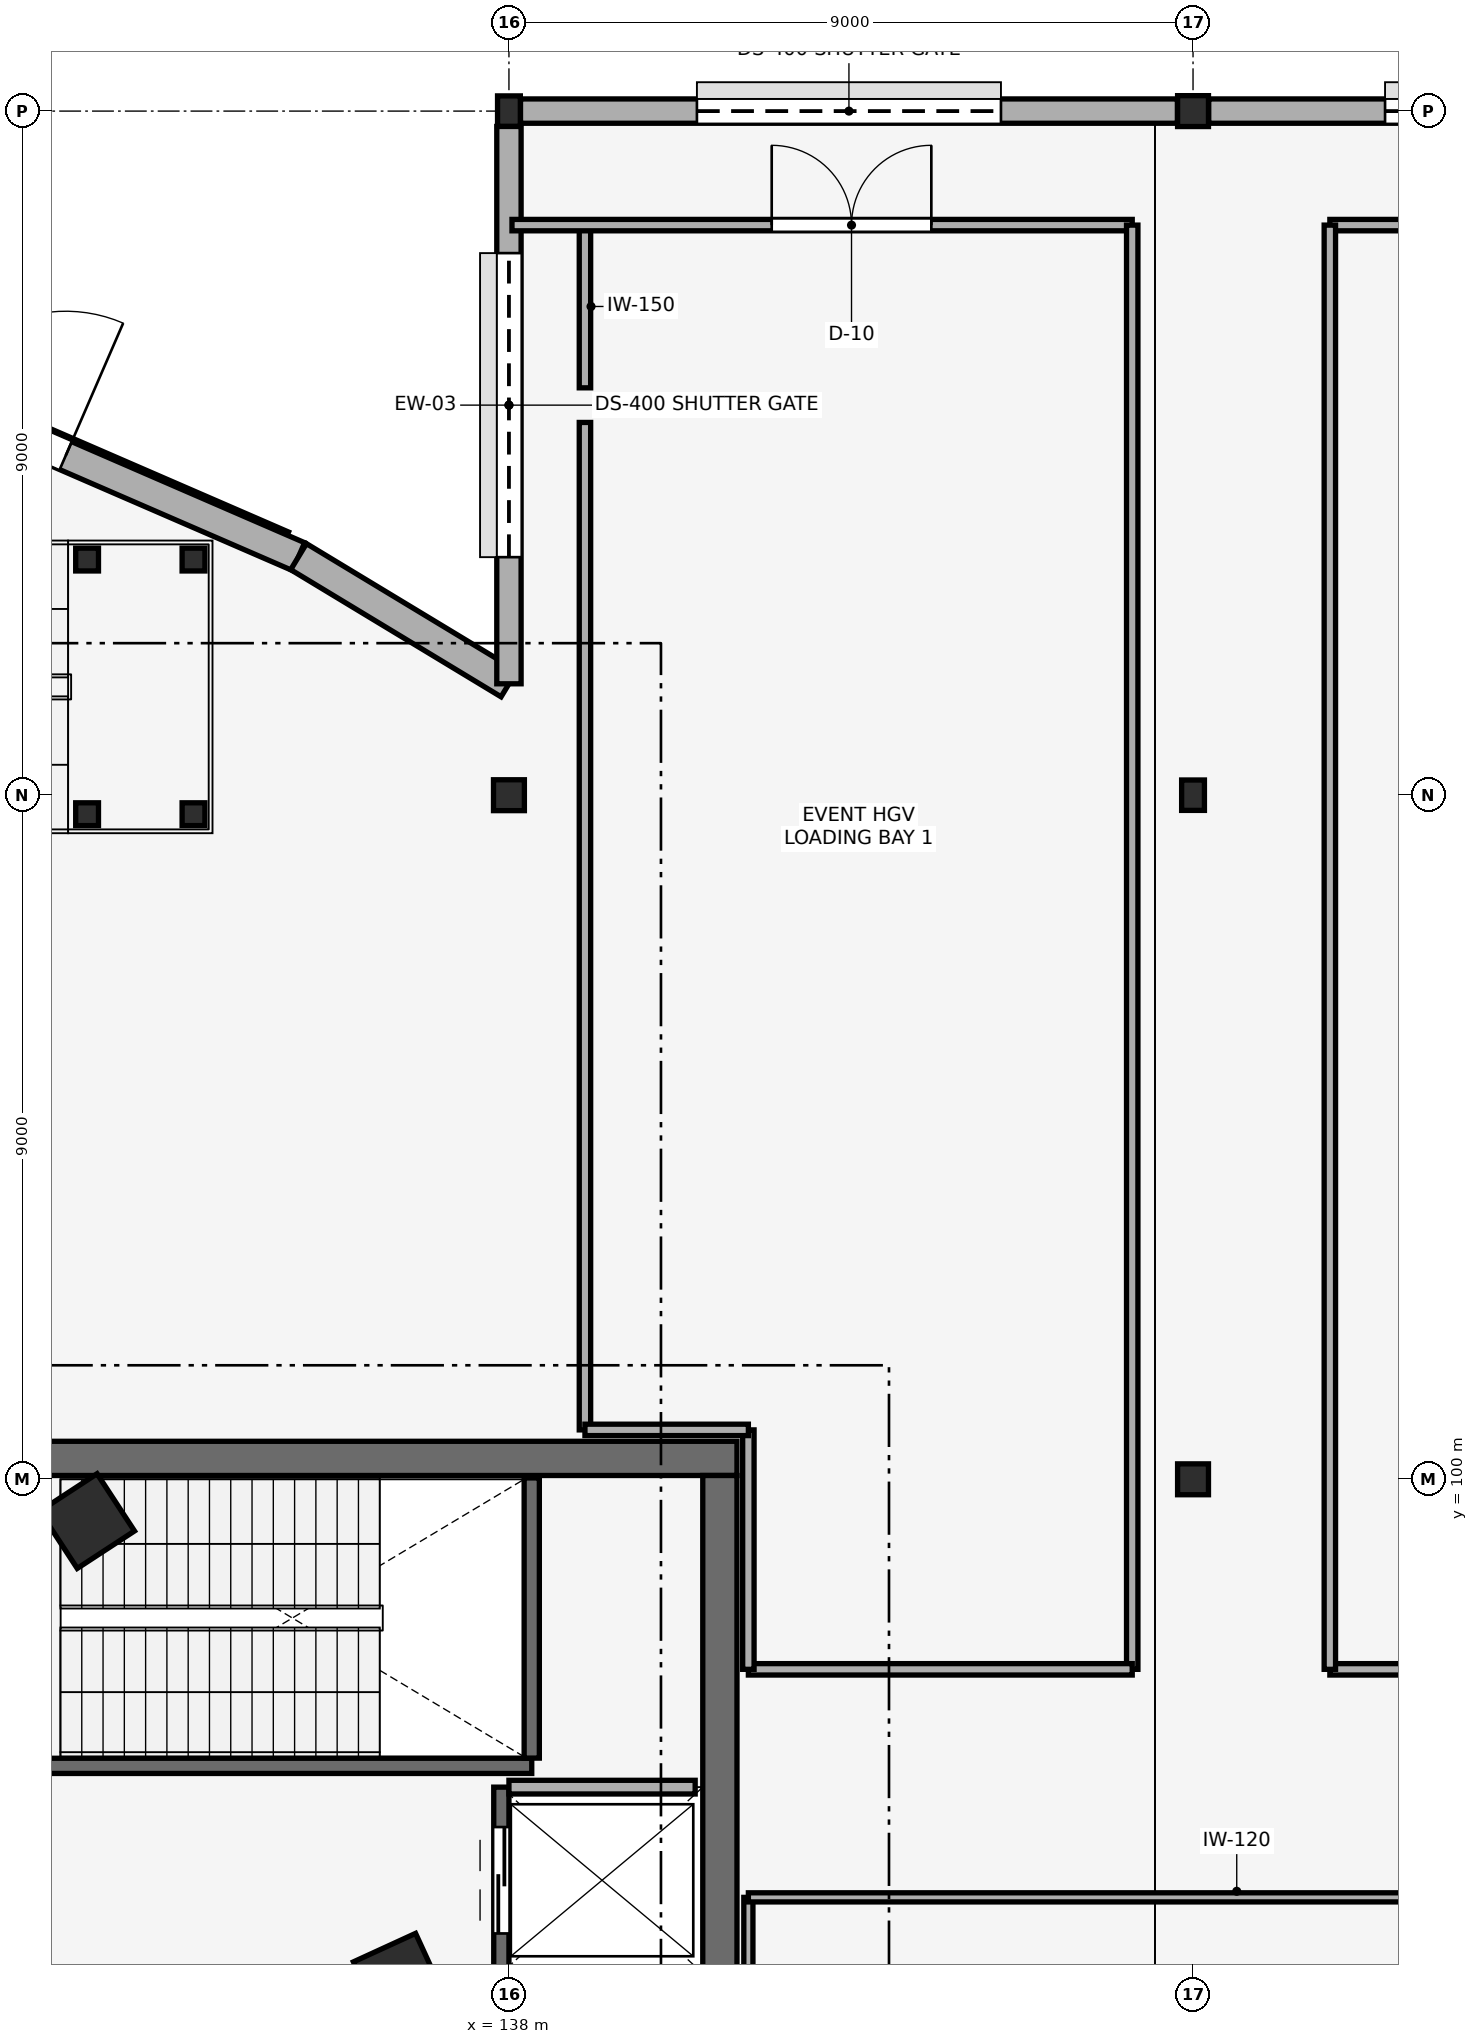
"""IFC4 building model, lengths in metres.
Left out: names, types, materials, properties, quantities, classifications, styles, units other than length and angle.
Written with IfcOpenShell. Run it as: python <this file> out.ifc"""

import sys

from ifc_helpers import new_model, si_unit, direction, frame, frame_2d, origin, origin_2d, place, context, subcontext, project, spatial, rectangle, hollow_rectangle, hollow_circle, i_section, extrude, element, fill, save


model = new_model("IFC4")
c1 = context("Model", 3, precision=1e-05, world=origin(), true_north=direction((0.0, 1.0)))
c2 = subcontext(c1, "Body", "Model", "MODEL_VIEW")
j1 = project(units=[si_unit("LENGTHUNIT", "METRE"), si_unit("PLANEANGLEUNIT", "RADIAN")], contexts=[c1])
p1 = place(None, origin())
s1 = spatial("IfcSite", under=j1, at=p1, CompositionType="ELEMENT")
p2 = place(p1, origin())
s2 = spatial("IfcBuilding", under=s1, at=p2, CompositionType="ELEMENT")
p3 = place(p2, origin())
s3 = spatial("IfcBuildingStorey", under=s2, at=p3, CompositionType="ELEMENT", Elevation=0.0)
for number, where, z_axis, x_axis in (
    (1, (136.55, 93.43, 0.0), (0.0, 0.0, 1.0), (0.909, 0.417, 0.0)),
    (2, (132.451, 99.45, 0.0), (0.0, 0.0, 1.0), (0.837, 0.547, 0.0)),
):
    element("IfcColumn", number, at=place(p3, frame(where, z_axis=z_axis, x_axis=x_axis)), inside=s3, PredefinedType="COLUMN", context=c2, shape_type="SweptSolid", body=[
        extrude(rectangle(XDim=0.9, YDim=0.9, at=origin_2d()), origin(), (0.0, 0.0, 1.0), 5.4),
    ])
p4 = place(p3, frame((138.0, 109.0, 0.0), z_axis=(0.0, 0.0, 1.0), x_axis=(1.0, 0.0, 0.0)))
e3 = element("IfcColumn", 3, at=p4, inside=s3, PredefinedType="COLUMN", context=c2, shape_type="SweptSolid", body=[
    extrude(hollow_circle(Radius=0.203, WallThickness=0.016, at=origin_2d()), origin(), (0.0, 0.0, 1.0), 5.4),
])
p5 = place(p3, frame((138.0, 118.0, 0.0), z_axis=(0.0, 0.0, 1.0), x_axis=(1.0, 0.0, 0.0)))
e4 = element("IfcColumn", 4, at=p5, inside=s3, PredefinedType="COLUMN", context=c2, shape_type="SweptSolid", body=[
    extrude(i_section(OverallWidth=0.3, OverallDepth=0.4, WebThickness=0.013, FlangeThickness=0.024, FilletRadius=0.027, at=origin_2d()), origin(), (0.0, 0.0, 1.0), 5.4),
])
p6 = place(p3, frame((147.0, 100.0, 0.0), z_axis=(0.0, 0.0, 1.0), x_axis=(1.0, 0.0, 0.0)))
e5 = element("IfcColumn", 5, at=p6, inside=s3, PredefinedType="COLUMN", context=c2, shape_type="SweptSolid", body=[
    extrude(hollow_circle(Radius=0.203, WallThickness=0.016, at=origin_2d()), origin(), (0.0, 0.0, 1.0), 5.4),
])
p7 = place(p3, frame((147.0, 109.0, 0.0), z_axis=(0.0, 0.0, 1.0), x_axis=(1.0, 0.0, 0.0)))
e6 = element("IfcColumn", 6, at=p7, inside=s3, PredefinedType="COLUMN", context=c2, shape_type="SweptSolid", body=[
    extrude(i_section(OverallWidth=0.3, OverallDepth=0.4, WebThickness=0.013, FlangeThickness=0.024, FilletRadius=0.027, at=origin_2d()), origin(), (0.0, 0.0, 1.0), 5.4),
])
p8 = place(p3, frame((147.0, 118.0, 0.0), z_axis=(0.0, 0.0, 1.0), x_axis=(1.0, 0.0, 0.0)))
e7 = element("IfcColumn", 7, at=p8, inside=s3, PredefinedType="COLUMN", context=c2, shape_type="SweptSolid", body=[
    extrude(hollow_circle(Radius=0.203, WallThickness=0.016, at=origin_2d()), origin(), (0.0, 0.0, 1.0), 5.4),
])
p9 = place(p3, frame((129.6, 100.275, 0.0), z_axis=(0.0, 0.0, 1.0), x_axis=(1.0, 0.0, 0.0)))
e8 = element("IfcWall", 8, at=p9, inside=s3, PredefinedType="SHEAR", context=c2, shape_type="SweptSolid", body=[
    extrude(rectangle(XDim=11.4, YDim=0.45, at=frame_2d((5.7, 0.0))), origin(), (0.0, 0.0, 1.0), 5.4),
])
p10 = place(p3, frame((140.775, 90.95, 0.0), z_axis=(0.0, 0.0, 1.0), x_axis=(0.0, 1.0, 0.0)))
e9 = element("IfcWall", 9, at=p10, inside=s3, PredefinedType="SHEAR", context=c2, shape_type="SweptSolid", body=[
    extrude(rectangle(XDim=9.1, YDim=0.45, at=frame_2d((4.55, 0.0))), origin(), (0.0, 0.0, 1.0), 5.4),
])
p11 = place(p3, frame((125.619, 116.308, 0.0), z_axis=(0.0, 0.0, 1.0), x_axis=(0.917436013805, -0.397883350461, 0.0)))
e10 = element("IfcWall", 10, at=p11, inside=s3, PredefinedType="STANDARD", context=c2, shape_type="SweptSolid", body=[
    extrude(rectangle(XDim=10.479, YDim=0.4, at=frame_2d((5.239, 0.0))), origin(), (0.0, 0.0, 1.0), 5.12),
])
p12 = place(p11, frame((3.339, 0.0, 0.0)))
e11 = element("IfcOpeningElement", 11, at=p12, cuts=e10, PredefinedType="OPENING", context=c2, shape_type="SweptSolid", body=[
    extrude(rectangle(XDim=3.8, YDim=2.8, at=frame_2d((1.9, 1.4))), frame((0.0, 0.21, 0.0), z_axis=(0.0, -1.0, 0.0), x_axis=(1.0, 0.0, 0.0)), (0.0, 0.0, 1.0), 0.42),
])
p13 = place(p3, frame((135.232, 112.138, 0.0), z_axis=(0.0, 0.0, 1.0), x_axis=(0.855809711202, -0.517290767569, 0.0)))
e12 = element("IfcWall", 12, at=p13, inside=s3, PredefinedType="STANDARD", context=c2, shape_type="SweptSolid", body=[
    extrude(rectangle(XDim=3.234, YDim=0.4, at=frame_2d((1.617, 0.0))), origin(), (0.0, 0.0, 1.0), 5.12),
])
p14 = place(p3, frame((138.0, 110.466, 0.0), z_axis=(0.0, 0.0, 1.0), x_axis=(0.0, 1.0, 0.0)))
e13 = element("IfcWall", 13, at=p14, inside=s3, PredefinedType="STANDARD", context=c2, shape_type="SweptSolid", body=[
    extrude(rectangle(XDim=7.333, YDim=0.32, at=frame_2d((3.666, 0.0))), origin(), (0.0, 0.0, 1.0), 4.815),
])
p15 = place(p14, frame((1.666, 0.0, 0.0)))
e14 = element("IfcOpeningElement", 14, at=p15, cuts=e13, PredefinedType="OPENING", context=c2, shape_type="SweptSolid", body=[
    extrude(rectangle(XDim=4.0, YDim=4.1, at=frame_2d((2.0, 2.05))), frame((0.0, 0.17, 0.0), z_axis=(0.0, -1.0, 0.0), x_axis=(1.0, 0.0, 0.0)), (0.0, 0.0, 1.0), 0.34),
])
p16 = place(p3, frame((138.152, 118.0, 0.0), z_axis=(0.0, 0.0, 1.0), x_axis=(1.0, 0.0, 0.0)))
e15 = element("IfcWall", 15, at=p16, inside=s3, PredefinedType="STANDARD", context=c2, shape_type="SweptSolid", body=[
    extrude(rectangle(XDim=8.643, YDim=0.32, at=frame_2d((4.321, 0.0))), origin(), (0.0, 0.0, 1.0), 4.507),
])
p17 = place(p16, frame((2.321, 0.0, 0.0)))
e16 = element("IfcOpeningElement", 16, at=p17, cuts=e15, PredefinedType="OPENING", context=c2, shape_type="SweptSolid", body=[
    extrude(rectangle(XDim=4.0, YDim=4.1, at=frame_2d((2.0, 2.05))), frame((0.0, 0.17, 0.0), z_axis=(0.0, -1.0, 0.0), x_axis=(1.0, 0.0, 0.0)), (0.0, 0.0, 1.0), 0.34),
])
p18 = place(p3, frame((147.205, 118.0, 0.0), z_axis=(0.0, 0.0, 1.0), x_axis=(1.0, 0.0, 0.0)))
e17 = element("IfcWall", 17, at=p18, inside=s3, PredefinedType="STANDARD", context=c2, shape_type="SweptSolid", body=[
    extrude(rectangle(XDim=8.643, YDim=0.32, at=frame_2d((4.321, 0.0))), origin(), (0.0, 0.0, 1.0), 4.507),
])
p19 = place(p18, frame((2.321, 0.0, 0.0)))
e18 = element("IfcOpeningElement", 18, at=p19, cuts=e17, PredefinedType="OPENING", context=c2, shape_type="SweptSolid", body=[
    extrude(rectangle(XDim=4.0, YDim=4.1, at=frame_2d((2.0, 2.05))), frame((0.0, 0.17, 0.0), z_axis=(0.0, -1.0, 0.0), x_axis=(1.0, 0.0, 0.0)), (0.0, 0.0, 1.0), 0.34),
])
p20 = place(p3, frame((137.9, 93.5, 0.0), z_axis=(0.0, 0.0, 1.0), x_axis=(0.0, 1.0, 0.0)))
e19 = element("IfcWall", 19, at=p20, inside=s3, PredefinedType="SHEAR", context=c2, shape_type="SweptSolid", body=[
    extrude(rectangle(XDim=2.45, YDim=0.2, at=frame_2d((1.225, 0.0))), origin(), (0.0, 0.0, 1.0), 5.12),
])
p21 = place(p20, frame((0.525, 0.0, 0.0)))
e20 = element("IfcOpeningElement", 20, at=p21, cuts=e19, PredefinedType="OPENING", context=c2, shape_type="SweptSolid", body=[
    extrude(rectangle(XDim=1.4, YDim=2.2, at=frame_2d((0.7, 1.1))), frame((0.0, 0.11, 0.0), z_axis=(0.0, -1.0, 0.0), x_axis=(1.0, 0.0, 0.0)), (0.0, 0.0, 1.0), 0.22),
])
p22 = place(p3, frame((138.0, 95.95, 0.0), z_axis=(0.0, 0.0, 1.0), x_axis=(1.0, 0.0, 0.0)))
e21 = element("IfcWall", 21, at=p22, inside=s3, PredefinedType="PARTITIONING", context=c2, shape_type="SweptSolid", body=[
    extrude(rectangle(XDim=2.45, YDim=0.18, at=frame_2d((1.225, 0.0))), origin(), (0.0, 0.0, 1.0), 5.4),
])
p23 = place(p3, frame((130.052, 96.23, 0.0), z_axis=(0.0, 0.0, 1.0), x_axis=(1.0, 0.0, 0.0)))
e22 = element("IfcWall", 22, at=p23, inside=s3, PredefinedType="SHEAR", context=c2, shape_type="SweptSolid", body=[
    extrude(rectangle(XDim=8.248, YDim=0.2, at=frame_2d((4.124, 0.0))), origin(), (0.0, 0.0, 1.0), 5.4),
])
p24 = place(p23, frame((0.4, 0.0, 0.0)))
e23 = element("IfcOpeningElement", 23, at=p24, cuts=e22, PredefinedType="OPENING", context=c2, shape_type="SweptSolid", body=[
    extrude(rectangle(XDim=1.1, YDim=2.15, at=frame_2d((0.55, 1.075))), frame((0.0, 0.11, 0.0), z_axis=(0.0, -1.0, 0.0), x_axis=(1.0, 0.0, 0.0)), (0.0, 0.0, 1.0), 0.22),
])
p25 = place(p3, frame((138.3, 96.332, 0.0), z_axis=(0.0, 0.0, 1.0), x_axis=(0.0, 1.0, 0.0)))
e24 = element("IfcWall", 24, at=p25, inside=s3, PredefinedType="SHEAR", context=c2, shape_type="SweptSolid", body=[
    extrude(rectangle(XDim=3.686, YDim=0.2, at=frame_2d((1.843, 0.0))), origin(), (0.0, 0.0, 1.0), 5.4),
])
for number, where, z_axis, x_axis in (
    (25, (132.45, 108.75, 0.0), (0.0, 0.0, 1.0), (1.0, 0.0, 0.0)),
    (26, (132.45, 112.1, 0.0), (0.0, 0.0, 1.0), (1.0, 0.0, 0.0)),
    (27, (133.85, 108.75, 0.0), (0.0, 0.0, 1.0), (1.0, 0.0, 0.0)),
    (28, (133.85, 112.1, 0.0), (0.0, 0.0, 1.0), (1.0, 0.0, 0.0)),
):
    element("IfcColumn", number, at=place(p3, frame(where, z_axis=z_axis, x_axis=x_axis)), inside=s3, PredefinedType="COLUMN", context=c2, shape_type="SweptSolid", body=[
        extrude(hollow_rectangle(XDim=0.3, YDim=0.3, WallThickness=0.012, at=origin_2d()), origin(), (0.0, 0.0, 1.0), 2.48),
    ])
p26 = place(p3, frame((139.0, 100.65, 0.0), z_axis=(0.0, 0.0, 1.0), x_axis=(0.0, 1.0, 0.0)))
e29 = element("IfcWall", 29, at=p26, inside=s3, PredefinedType="PARTITIONING", context=c2, shape_type="SweptSolid", body=[
    extrude(rectangle(XDim=13.254, YDim=0.15, at=frame_2d((6.627, 0.0))), origin(), (0.0, 0.0, 1.0), 5.12),
])
p27 = place(p3, frame((139.0, 114.359, 0.0), z_axis=(0.0, 0.0, 1.0), x_axis=(0.0, 1.0, 0.0)))
e30 = element("IfcWall", 30, at=p27, inside=s3, PredefinedType="PARTITIONING", context=c2, shape_type="SweptSolid", body=[
    extrude(rectangle(XDim=2.141, YDim=0.15, at=frame_2d((1.07, 0.0))), origin(), (0.0, 0.0, 1.0), 5.12),
])
p28 = place(p3, frame((138.04, 116.5, 0.0), z_axis=(0.0, 0.0, 1.0), x_axis=(1.0, 0.0, 0.0)))
e31 = element("IfcWall", 31, at=p28, inside=s3, PredefinedType="PARTITIONING", context=c2, shape_type="SweptSolid", body=[
    extrude(rectangle(XDim=8.16, YDim=0.15, at=frame_2d((4.08, 0.0))), origin(), (0.0, 0.0, 1.0), 5.12),
])
p29 = place(p28, frame((3.417, 0.0, 0.0)))
e32 = element("IfcOpeningElement", 32, at=p29, cuts=e31, PredefinedType="OPENING", context=c2, shape_type="SweptSolid", body=[
    extrude(rectangle(XDim=2.1, YDim=2.4, at=frame_2d((1.05, 1.2))), frame((0.0, 0.085, 0.0), z_axis=(0.0, -1.0, 0.0), x_axis=(1.0, 0.0, 0.0)), (0.0, 0.0, 1.0), 0.17),
])
p30 = place(p3, frame((146.2, 116.5, 0.0), z_axis=(0.0, 0.0, 1.0), x_axis=(0.0, -1.0, 0.0)))
e33 = element("IfcWall", 33, at=p30, inside=s3, PredefinedType="PARTITIONING", context=c2, shape_type="SweptSolid", body=[
    extrude(rectangle(XDim=19.0, YDim=0.15, at=frame_2d((9.5, 0.0))), origin(), (0.0, 0.0, 1.0), 5.12),
])
p31 = place(p3, frame((146.2, 97.5, 0.0), z_axis=(0.0, 0.0, 1.0), x_axis=(-1.0, 0.0, 0.0)))
e34 = element("IfcWall", 34, at=p31, inside=s3, PredefinedType="PARTITIONING", context=c2, shape_type="SweptSolid", body=[
    extrude(rectangle(XDim=5.05, YDim=0.15, at=frame_2d((2.525, 0.0))), origin(), (0.0, 0.0, 1.0), 5.12),
])
p32 = place(p3, frame((141.15, 97.5, 0.0), z_axis=(0.0, 0.0, 1.0), x_axis=(0.0, 1.0, 0.0)))
e35 = element("IfcWall", 35, at=p32, inside=s3, PredefinedType="PARTITIONING", context=c2, shape_type="SweptSolid", body=[
    extrude(rectangle(XDim=3.15, YDim=0.15, at=frame_2d((1.575, 0.0))), origin(), (0.0, 0.0, 1.0), 5.12),
])
p33 = place(p3, frame((141.15, 100.65, 0.0), z_axis=(0.0, 0.0, 1.0), x_axis=(-1.0, 0.0, 0.0)))
e36 = element("IfcWall", 36, at=p33, inside=s3, PredefinedType="PARTITIONING", context=c2, shape_type="SweptSolid", body=[
    extrude(rectangle(XDim=2.15, YDim=0.15, at=frame_2d((1.075, 0.0))), origin(), (0.0, 0.0, 1.0), 5.12),
])
p34 = place(p3, frame((148.8, 116.5, 0.0), z_axis=(0.0, 0.0, 1.0), x_axis=(1.0, 0.0, 0.0)))
e37 = element("IfcWall", 37, at=p34, inside=s3, PredefinedType="PARTITIONING", context=c2, shape_type="SweptSolid", body=[
    extrude(rectangle(XDim=7.0, YDim=0.15, at=frame_2d((3.5, 0.0))), origin(), (0.0, 0.0, 1.0), 5.12),
])
p35 = place(p3, frame((155.8, 97.5, 0.0), z_axis=(0.0, 0.0, 1.0), x_axis=(-1.0, 0.0, 0.0)))
e38 = element("IfcWall", 38, at=p35, inside=s3, PredefinedType="PARTITIONING", context=c2, shape_type="SweptSolid", body=[
    extrude(rectangle(XDim=7.0, YDim=0.15, at=frame_2d((3.5, 0.0))), origin(), (0.0, 0.0, 1.0), 5.12),
])
p36 = place(p35, frame((3.7, 0.0, 0.0)))
e39 = element("IfcOpeningElement", 39, at=p36, cuts=e38, PredefinedType="OPENING", context=c2, shape_type="SweptSolid", body=[
    extrude(rectangle(XDim=2.1, YDim=2.4, at=frame_2d((1.05, 1.2))), frame((0.0, 0.085, 0.0), z_axis=(0.0, -1.0, 0.0), x_axis=(1.0, 0.0, 0.0)), (0.0, 0.0, 1.0), 0.17),
])
p37 = place(p3, frame((148.8, 97.5, 0.0), z_axis=(0.0, 0.0, 1.0), x_axis=(0.0, 1.0, 0.0)))
e40 = element("IfcWall", 40, at=p37, inside=s3, PredefinedType="PARTITIONING", context=c2, shape_type="SweptSolid", body=[
    extrude(rectangle(XDim=19.0, YDim=0.15, at=frame_2d((9.5, 0.0))), origin(), (0.0, 0.0, 1.0), 5.12),
])
p38 = place(p3, frame((141.15, 90.35, 0.0), z_axis=(0.0, 0.0, 1.0), x_axis=(0.0, 1.0, 0.0)))
e41 = element("IfcWall", 41, at=p38, inside=s3, PredefinedType="PARTITIONING", context=c2, shape_type="SweptSolid", body=[
    extrude(rectangle(XDim=4.15, YDim=0.12, at=frame_2d((2.075, 0.0))), origin(), (0.0, 0.0, 1.0), 5.12),
])
p39 = place(p3, frame((141.15, 94.5, 0.0), z_axis=(0.0, 0.0, 1.0), x_axis=(1.0, 0.0, 0.0)))
e42 = element("IfcWall", 42, at=p39, inside=s3, PredefinedType="PARTITIONING", context=c2, shape_type="SweptSolid", body=[
    extrude(rectangle(XDim=12.85, YDim=0.12, at=frame_2d((6.425, 0.0))), origin(), (0.0, 0.0, 1.0), 5.12),
])
p40 = place(p39, frame((10.5, 0.0, 0.0)))
e43 = element("IfcOpeningElement", 43, at=p40, cuts=e42, PredefinedType="OPENING", context=c2, shape_type="SweptSolid", body=[
    extrude(rectangle(XDim=2.1, YDim=2.4, at=frame_2d((1.05, 1.2))), frame((0.0, 0.07, 0.0), z_axis=(0.0, -1.0, 0.0), x_axis=(1.0, 0.0, 0.0)), (0.0, 0.0, 1.0), 0.14),
])
p41 = place(p12, origin())
e44 = element("IfcDoor", 44, at=p41, inside=s3, OperationType="DOUBLE_DOOR_SINGLE_SWING", PredefinedType="DOOR", context=c2, shape_type="SweptSolid", body=[
    extrude(rectangle(XDim=3.8, YDim=2.8, at=frame_2d((1.9, 1.4))), frame((0.0, 0.025, 0.0), z_axis=(0.0, -1.0, 0.0), x_axis=(1.0, 0.0, 0.0)), (0.0, 0.0, 1.0), 0.05),
])
fill(e11, e44)
p42 = place(p15, origin())
e45 = element("IfcDoor", 45, at=p42, inside=s3, OperationType="ROLLINGUP", PredefinedType="GATE", context=c2, shape_type="SweptSolid", body=[
    extrude(rectangle(XDim=4.0, YDim=4.1, at=frame_2d((2.0, 2.05))), frame((0.0, 0.025, 0.0), z_axis=(0.0, -1.0, 0.0), x_axis=(1.0, 0.0, 0.0)), (0.0, 0.0, 1.0), 0.05),
])
fill(e14, e45)
p43 = place(p17, origin())
e46 = element("IfcDoor", 46, at=p43, inside=s3, OperationType="ROLLINGUP", PredefinedType="GATE", context=c2, shape_type="SweptSolid", body=[
    extrude(rectangle(XDim=4.0, YDim=4.1, at=frame_2d((2.0, 2.05))), frame((0.0, 0.025, 0.0), z_axis=(0.0, -1.0, 0.0), x_axis=(1.0, 0.0, 0.0)), (0.0, 0.0, 1.0), 0.05),
])
fill(e16, e46)
p44 = place(p19, origin())
e47 = element("IfcDoor", 47, at=p44, inside=s3, OperationType="ROLLINGUP", PredefinedType="GATE", context=c2, shape_type="SweptSolid", body=[
    extrude(rectangle(XDim=4.0, YDim=4.1, at=frame_2d((2.0, 2.05))), frame((0.0, 0.025, 0.0), z_axis=(0.0, -1.0, 0.0), x_axis=(1.0, 0.0, 0.0)), (0.0, 0.0, 1.0), 0.05),
])
fill(e18, e47)
p45 = place(p21, origin())
e48 = element("IfcDoor", 48, at=p45, inside=s3, OperationType="DOUBLE_DOOR_SLIDING", PredefinedType="DOOR", context=c2, shape_type="SweptSolid", body=[
    extrude(rectangle(XDim=1.4, YDim=2.2, at=frame_2d((0.7, 1.1))), frame((0.0, 0.025, 0.0), z_axis=(0.0, -1.0, 0.0), x_axis=(1.0, 0.0, 0.0)), (0.0, 0.0, 1.0), 0.05),
])
fill(e20, e48)
p46 = place(p29, origin())
e49 = element("IfcDoor", 49, at=p46, inside=s3, OperationType="DOUBLE_DOOR_SINGLE_SWING", PredefinedType="DOOR", context=c2, shape_type="SweptSolid", body=[
    extrude(rectangle(XDim=2.1, YDim=2.4, at=frame_2d((1.05, 1.2))), frame((0.0, 0.025, 0.0), z_axis=(0.0, -1.0, 0.0), x_axis=(1.0, 0.0, 0.0)), (0.0, 0.0, 1.0), 0.05),
])
fill(e32, e49)
save(model, sys.argv[1])
